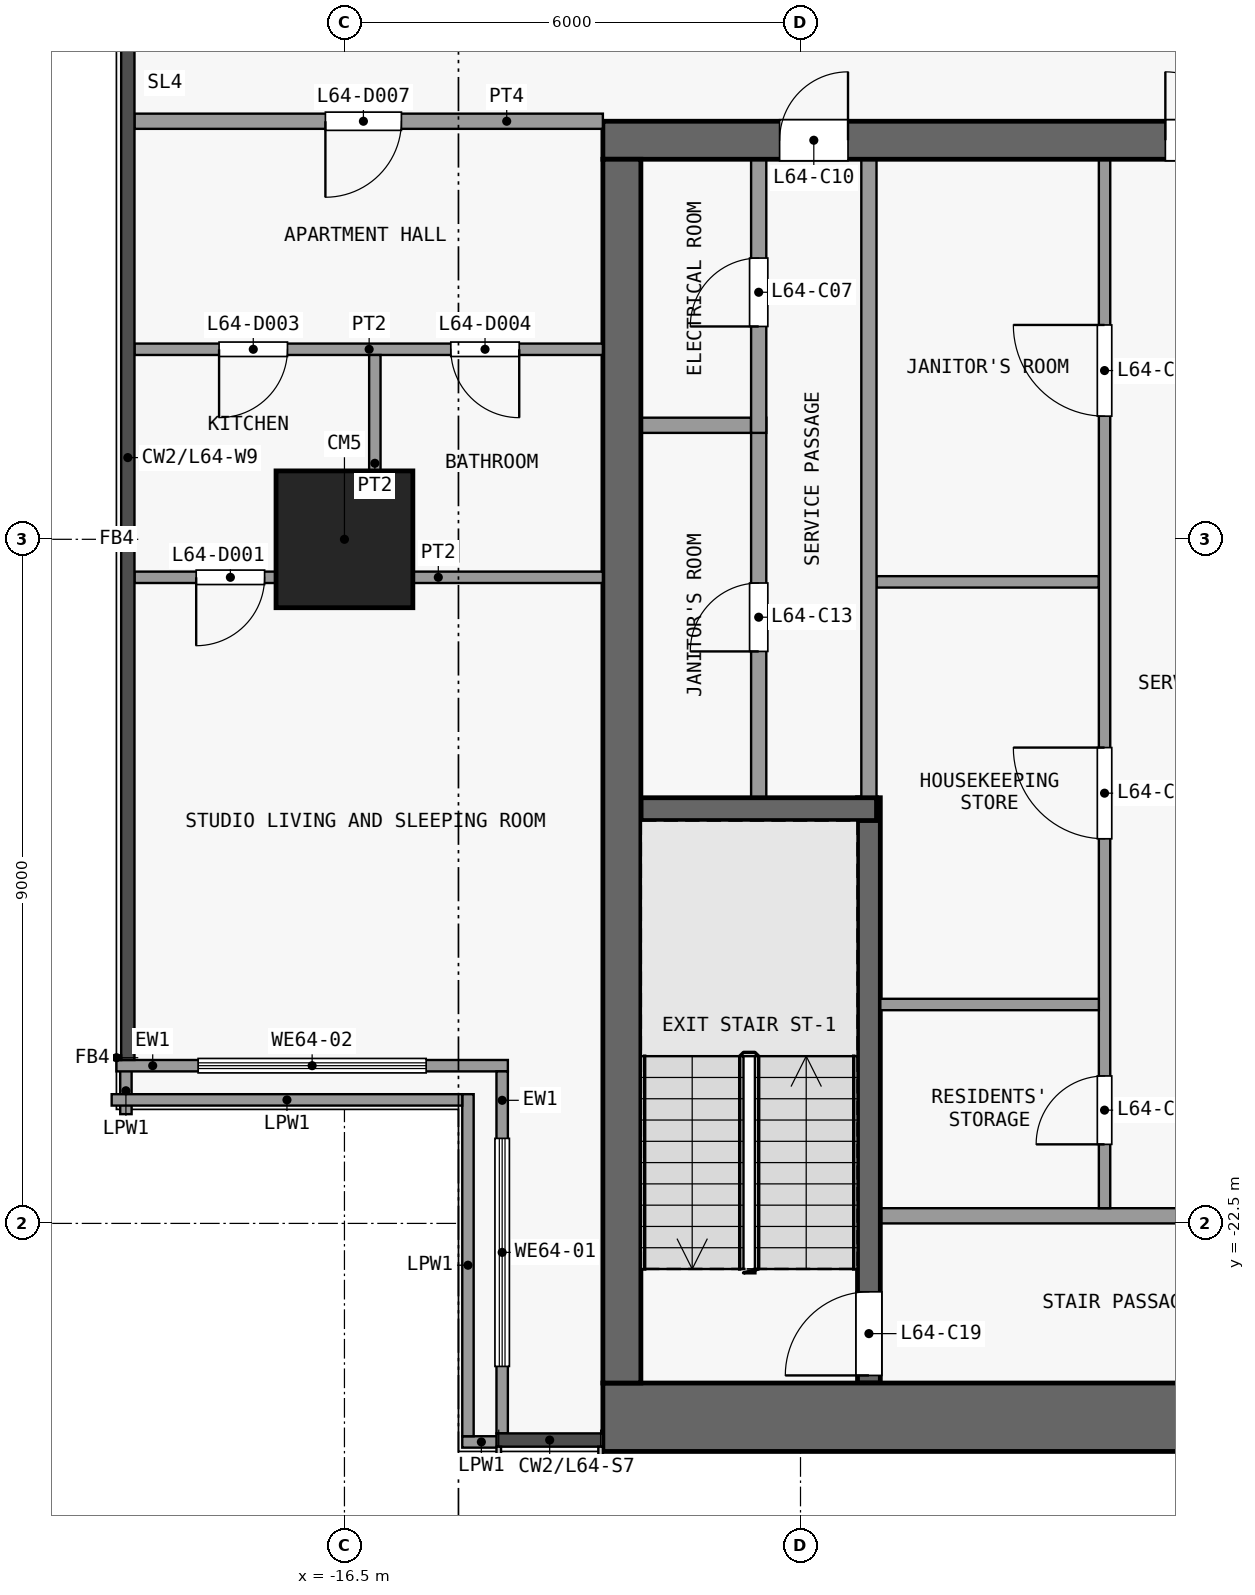
"""IFC4 building model, lengths in metres.
Left out: names, types, materials, properties, quantities, classifications, styles, units other than length and angle.
Written with IfcOpenShell. Run it as: python <this file> out.ifc"""

import sys

from ifc_helpers import new_model, si_unit, direction, frame, frame_2d, origin, origin_2d, place, context, subcontext, project, spatial, rectangle, extrude, element, fill, save


model = new_model("IFC4")
c1 = context("Model", 3, precision=1e-05, world=origin(), true_north=direction((0.0, 1.0)))
c2 = subcontext(c1, "Body", "Model", "MODEL_VIEW")
j1 = project(units=[si_unit("LENGTHUNIT", "METRE"), si_unit("PLANEANGLEUNIT", "RADIAN")], contexts=[c1])
p1 = place(None, origin())
s1 = spatial("IfcSite", under=j1, at=p1, CompositionType="ELEMENT")
p2 = place(p1, origin())
s2 = spatial("IfcBuilding", under=s1, at=p2, CompositionType="ELEMENT")
p3 = place(p2, frame((0.0, 0.0, 255.5)))
s3 = spatial("IfcBuildingStorey", under=s2, at=p3, CompositionType="ELEMENT", Elevation=255.5)
p4 = place(p3, frame((-16.5, -13.5, 0.0), z_axis=(0.0, 0.0, 1.0), x_axis=(1.0, 0.0, 0.0)))
e1 = element("IfcColumn", 1, at=p4, inside=s3, PredefinedType="COLUMN", context=c2, shape_type="SweptSolid", body=[
    extrude(rectangle(XDim=1.8, YDim=1.8, at=origin_2d()), origin(), (0.0, 0.0, 1.0), 3.6),
])
p5 = place(p3, frame((-13.1, -25.05, 0.0), z_axis=(0.0, 0.0, 1.0), x_axis=(1.0, 0.0, 0.0)))
e2 = element("IfcWall", 2, at=p5, inside=s3, PredefinedType="SHEAR", context=c2, shape_type="SweptSolid", body=[
    extrude(rectangle(XDim=26.2, YDim=0.9, at=frame_2d((13.1, 0.0))), origin(), (0.0, 0.0, 1.0), 3.3),
])
p6 = place(p3, frame((-13.1, -8.25, 0.0), z_axis=(0.0, 0.0, 1.0), x_axis=(1.0, 0.0, 0.0)))
e3 = element("IfcWall", 3, at=p6, inside=s3, PredefinedType="SHEAR", context=c2, shape_type="SweptSolid", body=[
    extrude(rectangle(XDim=26.2, YDim=0.5, at=frame_2d((13.1, 0.0))), origin(), (0.0, 0.0, 1.0), 3.3),
])
p7 = place(p6, frame((7.4, 0.0, 0.0)))
e4 = element("IfcOpeningElement", 4, at=p7, cuts=e3, PredefinedType="OPENING", context=c2, shape_type="SweptSolid", body=[
    extrude(rectangle(XDim=1.8, YDim=2.1, at=frame_2d((0.9, 1.05))), frame((0.0, 0.26, 0.0), z_axis=(0.0, -1.0, 0.0), x_axis=(1.0, 0.0, 0.0)), (0.0, 0.0, 1.0), 0.52),
])
p8 = place(p6, frame((17.0, 0.0, 0.0)))
e5 = element("IfcOpeningElement", 5, at=p8, cuts=e3, PredefinedType="OPENING", context=c2, shape_type="SweptSolid", body=[
    extrude(rectangle(XDim=1.8, YDim=2.1, at=frame_2d((0.9, 1.05))), frame((0.0, 0.26, 0.0), z_axis=(0.0, -1.0, 0.0), x_axis=(1.0, 0.0, 0.0)), (0.0, 0.0, 1.0), 0.52),
])
p9 = place(p6, frame((2.325, 0.0, 0.0)))
e6 = element("IfcOpeningElement", 6, at=p9, cuts=e3, PredefinedType="OPENING", context=c2, shape_type="SweptSolid", body=[
    extrude(rectangle(XDim=0.9, YDim=2.1, at=frame_2d((0.45, 1.05))), frame((0.0, 0.26, 0.0), z_axis=(0.0, -1.0, 0.0), x_axis=(1.0, 0.0, 0.0)), (0.0, 0.0, 1.0), 0.52),
])
p10 = place(p6, frame((23.675, 0.0, 0.0)))
e7 = element("IfcOpeningElement", 7, at=p10, cuts=e3, PredefinedType="OPENING", context=c2, shape_type="SweptSolid", body=[
    extrude(rectangle(XDim=1.2, YDim=2.1, at=frame_2d((0.6, 1.05))), frame((0.0, 0.26, 0.0), z_axis=(0.0, -1.0, 0.0), x_axis=(1.0, 0.0, 0.0)), (0.0, 0.0, 1.0), 0.52),
])
p11 = place(p3, frame((-12.85, -24.6, 0.0), z_axis=(0.0, 0.0, 1.0), x_axis=(0.0, 1.0, 0.0)))
e8 = element("IfcWall", 8, at=p11, inside=s3, PredefinedType="SHEAR", context=c2, shape_type="SweptSolid", body=[
    extrude(rectangle(XDim=16.1, YDim=0.5, at=frame_2d((8.05, 0.0))), origin(), (0.0, 0.0, 1.0), 3.3),
])
p12 = place(p3, frame((-3.25, -22.4, 0.0), z_axis=(0.0, 0.0, 1.0), x_axis=(-1.0, 0.0, 0.0)))
e9 = element("IfcWall", 9, at=p12, inside=s3, PredefinedType="PARTITIONING", context=c2, shape_type="SweptSolid", body=[
    extrude(rectangle(XDim=6.2, YDim=0.2, at=frame_2d((3.1, 0.0))), origin(), (0.0, 0.0, 1.0), 3.3),
])
p13 = place(p12, frame((0.8, 0.0, 0.0)))
e10 = element("IfcOpeningElement", 10, at=p13, cuts=e9, PredefinedType="OPENING", context=c2, shape_type="SweptSolid", body=[
    extrude(rectangle(XDim=1.5, YDim=2.1, at=frame_2d((0.75, 1.05))), frame((0.0, 0.11, 0.0), z_axis=(0.0, -1.0, 0.0), x_axis=(1.0, 0.0, 0.0)), (0.0, 0.0, 1.0), 0.22),
])
p14 = place(p3, frame((-9.45, -19.62, 0.0), z_axis=(0.0, 0.0, 1.0), x_axis=(1.0, 0.0, 0.0)))
e11 = element("IfcWall", 11, at=p14, inside=s3, PredefinedType="PARTITIONING", context=c2, shape_type="SweptSolid", body=[
    extrude(rectangle(XDim=2.875, YDim=0.15, at=frame_2d((1.438, 0.0))), origin(), (0.0, 0.0, 1.0), 3.3),
])
p15 = place(p3, frame((-12.6, -17.05, 0.0), z_axis=(0.0, 0.0, 1.0), x_axis=(1.0, 0.0, 0.0)))
e12 = element("IfcWall", 12, at=p15, inside=s3, PredefinedType="SHEAR", context=c2, shape_type="SweptSolid", body=[
    extrude(rectangle(XDim=3.1, YDim=0.3, at=frame_2d((1.55, 0.0))), origin(), (0.0, 0.0, 1.0), 3.3),
])
p16 = place(p3, frame((-9.5, -14.06, 0.0), z_axis=(0.0, 0.0, 1.0), x_axis=(1.0, 0.0, 0.0)))
e13 = element("IfcWall", 13, at=p16, inside=s3, PredefinedType="PARTITIONING", context=c2, shape_type="SweptSolid", body=[
    extrude(rectangle(XDim=2.925, YDim=0.15, at=frame_2d((1.462, 0.0))), origin(), (0.0, 0.0, 1.0), 3.3),
])
p17 = place(p3, frame((-12.6, -12.0, 0.0), z_axis=(0.0, 0.0, 1.0), x_axis=(1.0, 0.0, 0.0)))
e14 = element("IfcWall", 14, at=p17, inside=s3, PredefinedType="PARTITIONING", context=c2, shape_type="SweptSolid", body=[
    extrude(rectangle(XDim=1.45, YDim=0.2, at=frame_2d((0.725, 0.0))), origin(), (0.0, 0.0, 1.0), 3.3),
])
p18 = place(p3, frame((-11.05, -16.9, 0.0), z_axis=(0.0, 0.0, 1.0), x_axis=(0.0, 1.0, 0.0)))
e15 = element("IfcWall", 15, at=p18, inside=s3, PredefinedType="PARTITIONING", context=c2, shape_type="SweptSolid", body=[
    extrude(rectangle(XDim=5.0, YDim=0.2, at=frame_2d((2.5, 0.0))), origin(), (0.0, 0.0, 1.0), 3.3),
])
p19 = place(p18, frame((1.925, 0.0, 0.0)))
e16 = element("IfcOpeningElement", 16, at=p19, cuts=e15, PredefinedType="OPENING", context=c2, shape_type="SweptSolid", body=[
    extrude(rectangle(XDim=0.9, YDim=2.1, at=frame_2d((0.45, 1.05))), frame((0.0, 0.11, 0.0), z_axis=(0.0, -1.0, 0.0), x_axis=(1.0, 0.0, 0.0)), (0.0, 0.0, 1.0), 0.22),
])
p20 = place(p3, frame((-11.05, -12.1, 0.0), z_axis=(0.0, 0.0, 1.0), x_axis=(0.0, 1.0, 0.0)))
e17 = element("IfcWall", 17, at=p20, inside=s3, PredefinedType="PARTITIONING", context=c2, shape_type="SweptSolid", body=[
    extrude(rectangle(XDim=3.6, YDim=0.2, at=frame_2d((1.8, 0.0))), origin(), (0.0, 0.0, 1.0), 3.3),
])
p21 = place(p20, frame((1.4, 0.0, 0.0)))
e18 = element("IfcOpeningElement", 18, at=p21, cuts=e17, PredefinedType="OPENING", context=c2, shape_type="SweptSolid", body=[
    extrude(rectangle(XDim=0.9, YDim=2.1, at=frame_2d((0.45, 1.05))), frame((0.0, 0.11, 0.0), z_axis=(0.0, -1.0, 0.0), x_axis=(1.0, 0.0, 0.0)), (0.0, 0.0, 1.0), 0.22),
])
p22 = place(p3, frame((-9.6, -24.6, 0.0), z_axis=(0.0, 0.0, 1.0), x_axis=(0.0, 1.0, 0.0)))
e19 = element("IfcWall", 19, at=p22, inside=s3, PredefinedType="SHEAR", context=c2, shape_type="SweptSolid", body=[
    extrude(rectangle(XDim=7.7, YDim=0.3, at=frame_2d((3.85, 0.0))), origin(), (0.0, 0.0, 1.0), 3.3),
])
p23 = place(p22, frame((0.1, 0.0, 0.0)))
e20 = element("IfcOpeningElement", 20, at=p23, cuts=e19, PredefinedType="OPENING", context=c2, shape_type="SweptSolid", body=[
    extrude(rectangle(XDim=1.1, YDim=2.1, at=frame_2d((0.55, 1.05))), frame((0.0, 0.16, 0.0), z_axis=(0.0, -1.0, 0.0), x_axis=(1.0, 0.0, 0.0)), (0.0, 0.0, 1.0), 0.32),
])
p24 = place(p3, frame((-9.6, -16.9, 0.0), z_axis=(0.0, 0.0, 1.0), x_axis=(0.0, 1.0, 0.0)))
e21 = element("IfcWall", 21, at=p24, inside=s3, PredefinedType="PARTITIONING", context=c2, shape_type="SweptSolid", body=[
    extrude(rectangle(XDim=8.4, YDim=0.2, at=frame_2d((4.2, 0.0))), origin(), (0.0, 0.0, 1.0), 3.3),
])
p25 = place(p3, frame((-6.5, -22.3, 0.0), z_axis=(0.0, 0.0, 1.0), x_axis=(0.0, 1.0, 0.0)))
e22 = element("IfcWall", 22, at=p25, inside=s3, PredefinedType="PARTITIONING", context=c2, shape_type="SweptSolid", body=[
    extrude(rectangle(XDim=13.8, YDim=0.15, at=frame_2d((6.9, 0.0))), origin(), (0.0, 0.0, 1.0), 3.3),
])
p26 = place(p25, frame((0.84, 0.0, 0.0)))
e23 = element("IfcOpeningElement", 23, at=p26, cuts=e22, PredefinedType="OPENING", context=c2, shape_type="SweptSolid", body=[
    extrude(rectangle(XDim=0.9, YDim=2.1, at=frame_2d((0.45, 1.05))), frame((0.0, 0.085, 0.0), z_axis=(0.0, -1.0, 0.0), x_axis=(1.0, 0.0, 0.0)), (0.0, 0.0, 1.0), 0.17),
])
p27 = place(p25, frame((4.86, 0.0, 0.0)))
e24 = element("IfcOpeningElement", 24, at=p27, cuts=e22, PredefinedType="OPENING", context=c2, shape_type="SweptSolid", body=[
    extrude(rectangle(XDim=1.2, YDim=2.1, at=frame_2d((0.6, 1.05))), frame((0.0, 0.085, 0.0), z_axis=(0.0, -1.0, 0.0), x_axis=(1.0, 0.0, 0.0)), (0.0, 0.0, 1.0), 0.17),
])
p28 = place(p25, frame((10.42, 0.0, 0.0)))
e25 = element("IfcOpeningElement", 25, at=p28, cuts=e22, PredefinedType="OPENING", context=c2, shape_type="SweptSolid", body=[
    extrude(rectangle(XDim=1.2, YDim=2.1, at=frame_2d((0.6, 1.05))), frame((0.0, 0.085, 0.0), z_axis=(0.0, -1.0, 0.0), x_axis=(1.0, 0.0, 0.0)), (0.0, 0.0, 1.0), 0.17),
])
p29 = place(p3, frame((-14.425, -25.262, 0.0), z_axis=(0.0, 0.0, 1.0), x_axis=(0.0, 1.0, 0.0)))
e26 = element("IfcWall", 26, at=p29, inside=s3, PredefinedType="SOLIDWALL", context=c2, shape_type="SweptSolid", body=[
    extrude(rectangle(XDim=4.762, YDim=0.15, at=frame_2d((2.381, 0.0))), origin(), (0.0, 0.0, 1.0), 3.3),
])
p30 = place(p29, frame((0.881, 0.0, 0.9)))
e27 = element("IfcOpeningElement", 27, at=p30, cuts=e26, PredefinedType="OPENING", context=c2, shape_type="SweptSolid", body=[
    extrude(rectangle(XDim=3.0, YDim=2.4, at=frame_2d((1.5, 1.2))), frame((0.0, 0.085, 0.0), z_axis=(0.0, -1.0, 0.0), x_axis=(1.0, 0.0, 0.0)), (0.0, 0.0, 1.0), 0.17),
])
p31 = place(p3, frame((-14.35, -20.425, 0.0), z_axis=(0.0, 0.0, 1.0), x_axis=(-1.0, 0.0, 0.0)))
e28 = element("IfcWall", 28, at=p31, inside=s3, PredefinedType="SOLIDWALL", context=c2, shape_type="SweptSolid", body=[
    extrude(rectangle(XDim=5.15, YDim=0.15, at=frame_2d((2.575, 0.0))), origin(), (0.0, 0.0, 1.0), 3.3),
])
p32 = place(p31, frame((1.075, 0.0, 0.9)))
e29 = element("IfcOpeningElement", 29, at=p32, cuts=e28, PredefinedType="OPENING", context=c2, shape_type="SweptSolid", body=[
    extrude(rectangle(XDim=3.0, YDim=2.4, at=frame_2d((1.5, 1.2))), frame((0.0, 0.085, 0.0), z_axis=(0.0, -1.0, 0.0), x_axis=(1.0, 0.0, 0.0)), (0.0, 0.0, 1.0), 0.17),
])
p33 = place(p3, frame((-19.375, -21.062, 0.0), z_axis=(0.0, 0.0, 1.0), x_axis=(0.0, 1.0, 0.0)))
e30 = element("IfcWall", 30, at=p33, inside=s3, PredefinedType="PARAPET", context=c2, shape_type="SweptSolid", body=[
    extrude(rectangle(XDim=0.615, YDim=0.15, at=frame_2d((0.308, 0.0))), origin(), (0.0, 0.0, 1.0), 1.15),
])
p34 = place(p3, frame((-14.448, -25.375, 0.0), z_axis=(0.0, 0.0, 1.0), x_axis=(-1.0, 0.0, 0.0)))
e31 = element("IfcWall", 31, at=p34, inside=s3, PredefinedType="PARAPET", context=c2, shape_type="SweptSolid", body=[
    extrude(rectangle(XDim=0.502, YDim=0.15, at=frame_2d((0.251, 0.0))), origin(), (0.0, 0.0, 1.0), 1.15),
])
p35 = place(p3, frame((-14.875, -25.3, 0.0), z_axis=(0.0, 0.0, 1.0), x_axis=(0.0, 1.0, 0.0)))
e32 = element("IfcWall", 32, at=p35, inside=s3, PredefinedType="PARAPET", context=c2, shape_type="SweptSolid", body=[
    extrude(rectangle(XDim=4.5, YDim=0.15, at=frame_2d((2.25, 0.0))), origin(), (0.0, 0.0, 1.0), 1.15),
])
p36 = place(p3, frame((-14.95, -20.875, 0.0), z_axis=(0.0, 0.0, 1.0), x_axis=(-1.0, 0.0, 0.0)))
e33 = element("IfcWall", 33, at=p36, inside=s3, PredefinedType="PARAPET", context=c2, shape_type="SweptSolid", body=[
    extrude(rectangle(XDim=4.613, YDim=0.15, at=frame_2d((2.306, 0.0))), origin(), (0.0, 0.0, 1.0), 1.15),
])
p37 = place(p3, frame((-19.262, -14.0, 0.0), z_axis=(0.0, 0.0, 1.0), x_axis=(1.0, 0.0, 0.0)))
e34 = element("IfcWall", 34, at=p37, inside=s3, PredefinedType="PARTITIONING", context=c2, shape_type="SweptSolid", body=[
    extrude(rectangle(XDim=6.162, YDim=0.15, at=frame_2d((3.081, 0.0))), origin(), (0.0, 0.0, 1.0), 3.3),
])
p38 = place(p37, frame((0.812, 0.0, 0.0)))
e35 = element("IfcOpeningElement", 35, at=p38, cuts=e34, PredefinedType="OPENING", context=c2, shape_type="SweptSolid", body=[
    extrude(rectangle(XDim=0.9, YDim=2.1, at=frame_2d((0.45, 1.05))), frame((0.0, 0.085, 0.0), z_axis=(0.0, -1.0, 0.0), x_axis=(1.0, 0.0, 0.0)), (0.0, 0.0, 1.0), 0.17),
])
p39 = place(p3, frame((-19.262, -11.0, 0.0), z_axis=(0.0, 0.0, 1.0), x_axis=(1.0, 0.0, 0.0)))
e36 = element("IfcWall", 36, at=p39, inside=s3, PredefinedType="PARTITIONING", context=c2, shape_type="SweptSolid", body=[
    extrude(rectangle(XDim=6.162, YDim=0.15, at=frame_2d((3.081, 0.0))), origin(), (0.0, 0.0, 1.0), 3.3),
])
p40 = place(p39, frame((1.113, 0.0, 0.0)))
e37 = element("IfcOpeningElement", 37, at=p40, cuts=e36, PredefinedType="OPENING", context=c2, shape_type="SweptSolid", body=[
    extrude(rectangle(XDim=0.9, YDim=2.1, at=frame_2d((0.45, 1.05))), frame((0.0, 0.085, 0.0), z_axis=(0.0, -1.0, 0.0), x_axis=(1.0, 0.0, 0.0)), (0.0, 0.0, 1.0), 0.17),
])
p41 = place(p39, frame((4.162, 0.0, 0.0)))
e38 = element("IfcOpeningElement", 38, at=p41, cuts=e36, PredefinedType="OPENING", context=c2, shape_type="SweptSolid", body=[
    extrude(rectangle(XDim=0.9, YDim=2.1, at=frame_2d((0.45, 1.05))), frame((0.0, 0.085, 0.0), z_axis=(0.0, -1.0, 0.0), x_axis=(1.0, 0.0, 0.0)), (0.0, 0.0, 1.0), 0.17),
])
p42 = place(p3, frame((-19.262, -8.0, 0.0), z_axis=(0.0, 0.0, 1.0), x_axis=(1.0, 0.0, 0.0)))
e39 = element("IfcWall", 39, at=p42, inside=s3, PredefinedType="PARTITIONING", context=c2, shape_type="SweptSolid", body=[
    extrude(rectangle(XDim=6.162, YDim=0.2, at=frame_2d((3.081, 0.0))), origin(), (0.0, 0.0, 1.0), 3.3),
])
p43 = place(p42, frame((2.512, 0.0, 0.0)))
e40 = element("IfcOpeningElement", 40, at=p43, cuts=e39, PredefinedType="OPENING", context=c2, shape_type="SweptSolid", body=[
    extrude(rectangle(XDim=1.0, YDim=2.1, at=frame_2d((0.5, 1.05))), frame((0.0, 0.11, 0.0), z_axis=(0.0, -1.0, 0.0), x_axis=(1.0, 0.0, 0.0)), (0.0, 0.0, 1.0), 0.22),
])
p44 = place(p3, frame((-16.1, -13.925, 0.0), z_axis=(0.0, 0.0, 1.0), x_axis=(0.0, 1.0, 0.0)))
e41 = element("IfcWall", 41, at=p44, inside=s3, PredefinedType="PARTITIONING", context=c2, shape_type="SweptSolid", body=[
    extrude(rectangle(XDim=2.85, YDim=0.15, at=frame_2d((1.425, 0.0))), origin(), (0.0, 0.0, 1.0), 3.3),
])
p45 = place(p7, origin())
e42 = element("IfcDoor", 42, at=p45, inside=s3, OperationType="DOUBLE_DOOR_SINGLE_SWING", PredefinedType="DOOR", context=c2, shape_type="SweptSolid", body=[
    extrude(rectangle(XDim=1.8, YDim=2.1, at=frame_2d((0.9, 1.05))), frame((0.0, 0.025, 0.0), z_axis=(0.0, -1.0, 0.0), x_axis=(1.0, 0.0, 0.0)), (0.0, 0.0, 1.0), 0.05),
])
fill(e4, e42)
p46 = place(p21, origin())
e43 = element("IfcDoor", 43, at=p46, inside=s3, OperationType="SINGLE_SWING_LEFT", PredefinedType="DOOR", context=c2, shape_type="SweptSolid", body=[
    extrude(rectangle(XDim=0.9, YDim=2.1, at=frame_2d((0.45, 1.05))), frame((0.0, 0.025, 0.0), z_axis=(0.0, -1.0, 0.0), x_axis=(1.0, 0.0, 0.0)), (0.0, 0.0, 1.0), 0.05),
])
fill(e18, e43)
p47 = place(p9, origin())
e44 = element("IfcDoor", 44, at=p47, inside=s3, OperationType="SINGLE_SWING_RIGHT", PredefinedType="DOOR", context=c2, shape_type="SweptSolid", body=[
    extrude(rectangle(XDim=0.9, YDim=2.1, at=frame_2d((0.45, 1.05))), frame((0.0, 0.025, 0.0), z_axis=(0.0, -1.0, 0.0), x_axis=(1.0, 0.0, 0.0)), (0.0, 0.0, 1.0), 0.05),
])
fill(e6, e44)
p48 = place(p19, origin())
e45 = element("IfcDoor", 45, at=p48, inside=s3, OperationType="SINGLE_SWING_LEFT", PredefinedType="DOOR", context=c2, shape_type="SweptSolid", body=[
    extrude(rectangle(XDim=0.9, YDim=2.1, at=frame_2d((0.45, 1.05))), frame((0.0, 0.025, 0.0), z_axis=(0.0, -1.0, 0.0), x_axis=(1.0, 0.0, 0.0)), (0.0, 0.0, 1.0), 0.05),
])
fill(e16, e45)
p49 = place(p26, origin())
e46 = element("IfcDoor", 46, at=p49, inside=s3, OperationType="SINGLE_SWING_LEFT", PredefinedType="DOOR", context=c2, shape_type="SweptSolid", body=[
    extrude(rectangle(XDim=0.9, YDim=2.1, at=frame_2d((0.45, 1.05))), frame((0.0, 0.025, 0.0), z_axis=(0.0, -1.0, 0.0), x_axis=(1.0, 0.0, 0.0)), (0.0, 0.0, 1.0), 0.05),
])
fill(e23, e46)
p50 = place(p27, origin())
e47 = element("IfcDoor", 47, at=p50, inside=s3, OperationType="SINGLE_SWING_RIGHT", PredefinedType="DOOR", context=c2, shape_type="SweptSolid", body=[
    extrude(rectangle(XDim=1.2, YDim=2.1, at=frame_2d((0.6, 1.05))), frame((0.0, 0.025, 0.0), z_axis=(0.0, -1.0, 0.0), x_axis=(1.0, 0.0, 0.0)), (0.0, 0.0, 1.0), 0.05),
])
fill(e24, e47)
p51 = place(p28, origin())
e48 = element("IfcDoor", 48, at=p51, inside=s3, OperationType="SINGLE_SWING_RIGHT", PredefinedType="DOOR", context=c2, shape_type="SweptSolid", body=[
    extrude(rectangle(XDim=1.2, YDim=2.1, at=frame_2d((0.6, 1.05))), frame((0.0, 0.025, 0.0), z_axis=(0.0, -1.0, 0.0), x_axis=(1.0, 0.0, 0.0)), (0.0, 0.0, 1.0), 0.05),
])
fill(e25, e48)
p52 = place(p23, origin())
e49 = element("IfcDoor", 49, at=p52, inside=s3, OperationType="SINGLE_SWING_LEFT", PredefinedType="DOOR", context=c2, shape_type="SweptSolid", body=[
    extrude(rectangle(XDim=1.1, YDim=2.1, at=frame_2d((0.55, 1.05))), frame((0.0, 0.025, 0.0), z_axis=(0.0, -1.0, 0.0), x_axis=(1.0, 0.0, 0.0)), (0.0, 0.0, 1.0), 0.05),
])
fill(e20, e49)
p53 = place(p30, origin())
e50 = element("IfcWindow", 50, at=p53, inside=s3, PartitioningType="SINGLE_PANEL", PredefinedType="WINDOW", context=c2, shape_type="SweptSolid", body=[
    extrude(rectangle(XDim=3.0, YDim=2.4, at=frame_2d((1.5, 1.2))), frame((0.0, 0.03, 0.0), z_axis=(0.0, -1.0, 0.0), x_axis=(1.0, 0.0, 0.0)), (0.0, 0.0, 1.0), 0.06),
])
fill(e27, e50)
p54 = place(p32, origin())
e51 = element("IfcWindow", 51, at=p54, inside=s3, PartitioningType="SINGLE_PANEL", PredefinedType="WINDOW", context=c2, shape_type="SweptSolid", body=[
    extrude(rectangle(XDim=3.0, YDim=2.4, at=frame_2d((1.5, 1.2))), frame((0.0, 0.03, 0.0), z_axis=(0.0, -1.0, 0.0), x_axis=(1.0, 0.0, 0.0)), (0.0, 0.0, 1.0), 0.06),
])
fill(e29, e51)
p55 = place(p38, origin())
e52 = element("IfcDoor", 52, at=p55, inside=s3, OperationType="SINGLE_SWING_LEFT", PredefinedType="DOOR", context=c2, shape_type="SweptSolid", body=[
    extrude(rectangle(XDim=0.9, YDim=2.1, at=frame_2d((0.45, 1.05))), frame((0.0, 0.025, 0.0), z_axis=(0.0, -1.0, 0.0), x_axis=(1.0, 0.0, 0.0)), (0.0, 0.0, 1.0), 0.05),
])
fill(e35, e52)
p56 = place(p40, origin())
e53 = element("IfcDoor", 53, at=p56, inside=s3, OperationType="SINGLE_SWING_LEFT", PredefinedType="DOOR", context=c2, shape_type="SweptSolid", body=[
    extrude(rectangle(XDim=0.9, YDim=2.1, at=frame_2d((0.45, 1.05))), frame((0.0, 0.025, 0.0), z_axis=(0.0, -1.0, 0.0), x_axis=(1.0, 0.0, 0.0)), (0.0, 0.0, 1.0), 0.05),
])
fill(e37, e53)
p57 = place(p41, origin())
e54 = element("IfcDoor", 54, at=p57, inside=s3, OperationType="SINGLE_SWING_RIGHT", PredefinedType="DOOR", context=c2, shape_type="SweptSolid", body=[
    extrude(rectangle(XDim=0.9, YDim=2.1, at=frame_2d((0.45, 1.05))), frame((0.0, 0.025, 0.0), z_axis=(0.0, -1.0, 0.0), x_axis=(1.0, 0.0, 0.0)), (0.0, 0.0, 1.0), 0.05),
])
fill(e38, e54)
p58 = place(p43, origin())
e55 = element("IfcDoor", 55, at=p58, inside=s3, OperationType="SINGLE_SWING_LEFT", PredefinedType="DOOR", context=c2, shape_type="SweptSolid", body=[
    extrude(rectangle(XDim=1.0, YDim=2.1, at=frame_2d((0.5, 1.05))), frame((0.0, 0.025, 0.0), z_axis=(0.0, -1.0, 0.0), x_axis=(1.0, 0.0, 0.0)), (0.0, 0.0, 1.0), 0.05),
])
fill(e40, e55)
save(model, sys.argv[1])
